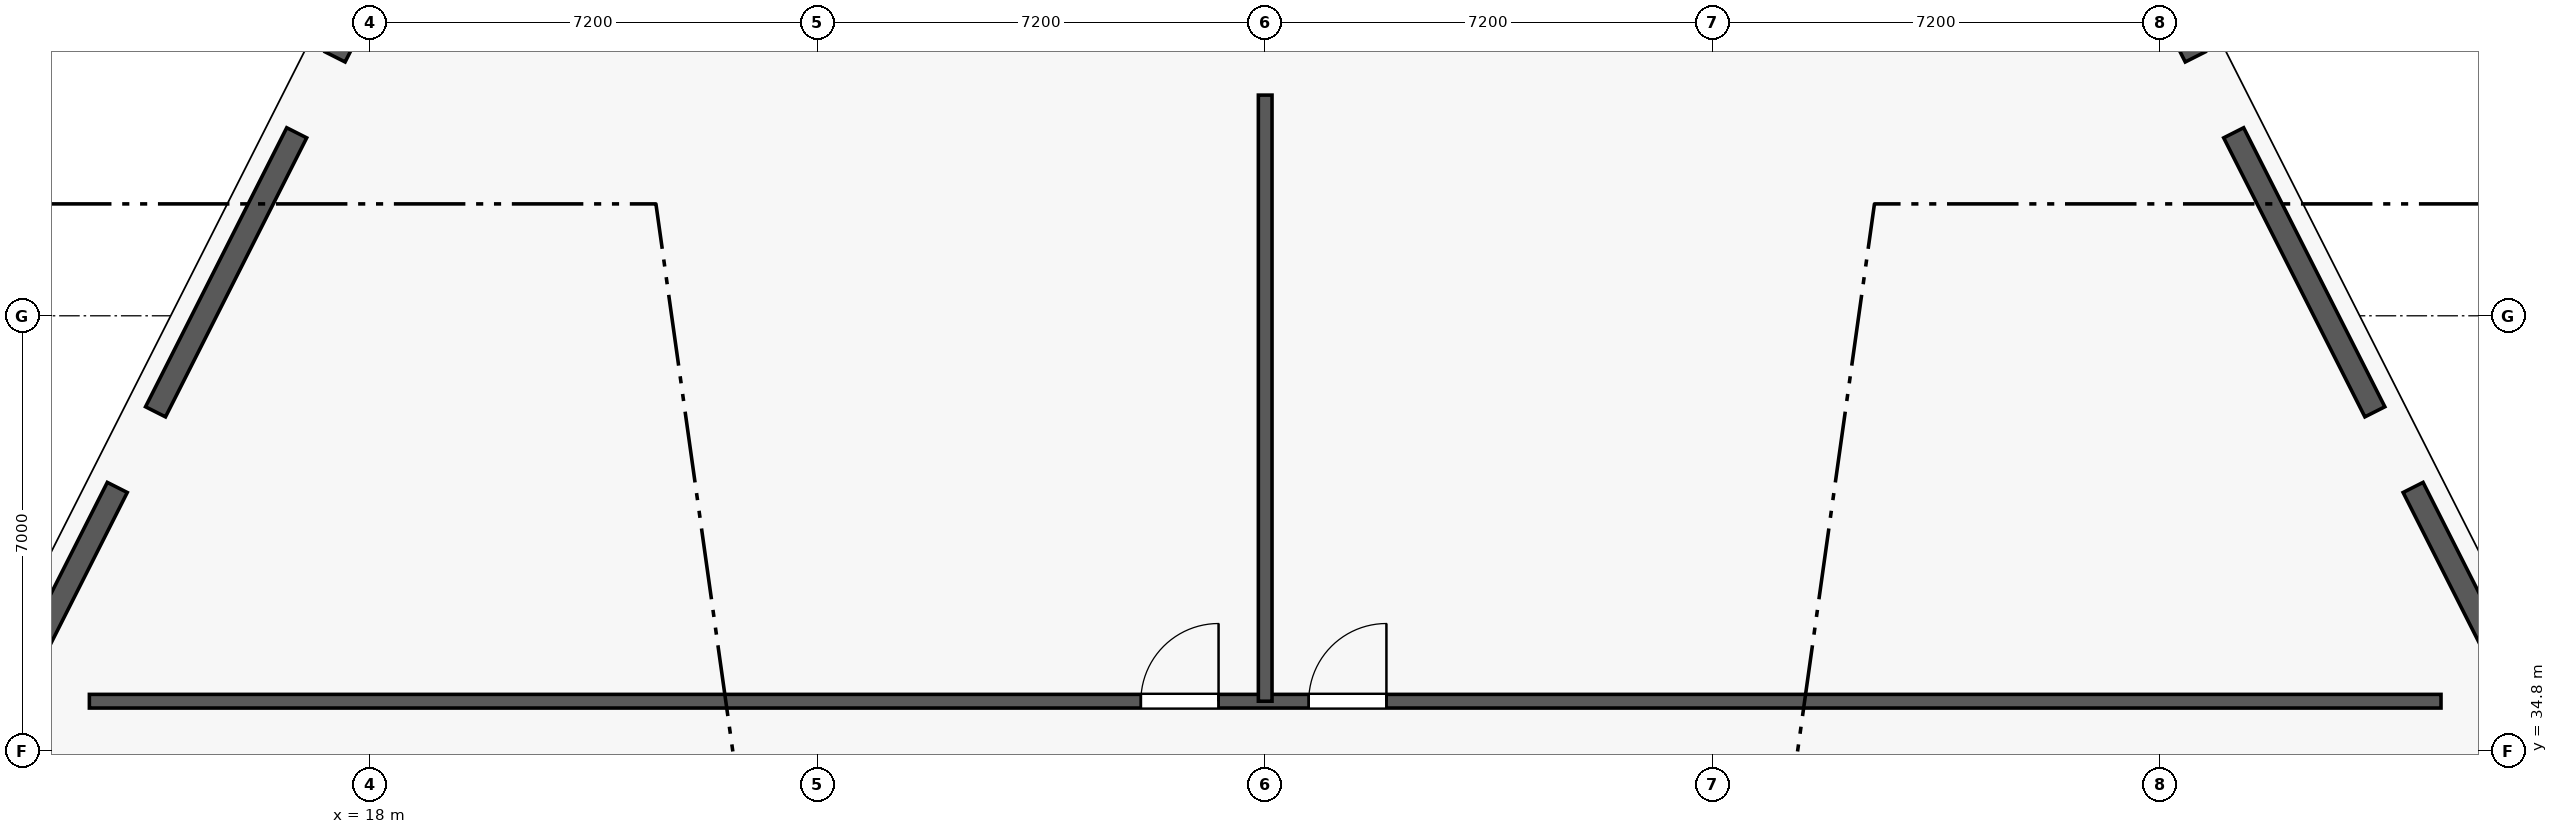
"""IFC4 building model, lengths in metres.
Left out: names, types, materials, properties, quantities, classifications, styles, units other than length and angle.
Written with IfcOpenShell. Run it as: python <this file> out.ifc"""

import sys

from ifc_helpers import new_model, si_unit, direction, frame, frame_2d, origin, origin_2d, place, context, subcontext, project, spatial, rectangle, extrude, element, fill, save


model = new_model("IFC4")
c1 = context("Model", 3, precision=1e-05, world=origin(), true_north=direction((0.0, 1.0)))
c2 = subcontext(c1, "Body", "Model", "MODEL_VIEW")
j1 = project(units=[si_unit("LENGTHUNIT", "METRE"), si_unit("PLANEANGLEUNIT", "RADIAN")], contexts=[c1])
p1 = place(None, origin())
s1 = spatial("IfcSite", under=j1, at=p1, CompositionType="ELEMENT")
p2 = place(p1, origin())
s2 = spatial("IfcBuilding", under=s1, at=p2, CompositionType="ELEMENT")
p3 = place(p2, frame((0.0, 0.0, 148.1)))
s3 = spatial("IfcBuildingStorey", under=s2, at=p3, CompositionType="ELEMENT", Elevation=148.1)
for number, where, z_axis, x_axis in (
    (1, (50.489, 39.645, 0.0), (0.0, 0.0, 1.0), (1.0, 0.0, 0.0)),
    (2, (47.649, 45.354, 0.0), (0.0, 0.0, 1.0), (1.0, 0.0, 0.0)),
    (3, (17.151, 45.354, 0.0), (0.0, 0.0, 1.0), (1.0, 0.0, 0.0)),
    (4, (14.311, 39.645, 0.0), (0.0, 0.0, 1.0), (1.0, 0.0, 0.0)),
):
    element("IfcColumn", number, at=place(p3, frame(where, z_axis=z_axis, x_axis=x_axis)), inside=s3, PredefinedType="COLUMN", context=c2, shape_type="SweptSolid", body=[
        extrude(rectangle(XDim=1.05, YDim=1.05, at=origin_2d()), origin(), (0.0, 0.0, 1.0), 5.4),
    ])
p4 = place(p3, frame((13.487, 35.6, 0.0), z_axis=(0.0, 0.0, 1.0), x_axis=(1.0, 0.0, 0.0)))
e5 = element("IfcWall", 5, at=p4, inside=s3, PredefinedType="PARTITIONING", context=c2, shape_type="SweptSolid", body=[
    extrude(rectangle(XDim=37.826, YDim=0.22, at=frame_2d((18.913, 0.0))), origin(), (0.0, 0.0, 1.0), 5.19),
])
p5 = place(p4, frame((16.913, 0.0, 0.0)))
e6 = element("IfcOpeningElement", 6, at=p5, cuts=e5, PredefinedType="OPENING", context=c2, shape_type="SweptSolid", body=[
    extrude(rectangle(XDim=1.25, YDim=2.25, at=frame_2d((0.625, 1.125))), frame((0.0, 0.12, 0.0), z_axis=(0.0, -1.0, 0.0), x_axis=(1.0, 0.0, 0.0)), (0.0, 0.0, 1.0), 0.24),
])
p6 = place(p4, frame((19.613, 0.0, 0.0)))
e7 = element("IfcOpeningElement", 7, at=p6, cuts=e5, PredefinedType="OPENING", context=c2, shape_type="SweptSolid", body=[
    extrude(rectangle(XDim=1.25, YDim=2.25, at=frame_2d((0.625, 1.125))), frame((0.0, 0.12, 0.0), z_axis=(0.0, -1.0, 0.0), x_axis=(1.0, 0.0, 0.0)), (0.0, 0.0, 1.0), 0.24),
])
p7 = place(p3, frame((32.4, 35.6, 0.0), z_axis=(0.0, 0.0, 1.0), x_axis=(0.0, 1.0, 0.0)))
e8 = element("IfcWall", 8, at=p7, inside=s3, PredefinedType="PARTITIONING", context=c2, shape_type="SweptSolid", body=[
    extrude(rectangle(XDim=9.75, YDim=0.22, at=frame_2d((4.875, 0.0))), origin(), (0.0, 0.0, 1.0), 5.19),
])
p8 = place(p3, frame((53.218, 34.386, 0.0), z_axis=(0.0, 0.0, 1.0), x_axis=(-0.451422282023, 0.892310441098, 0.0)))
e9 = element("IfcWall", 9, at=p8, inside=s3, PredefinedType="STANDARD", context=c2, shape_type="SweptSolid", body=[
    extrude(rectangle(XDim=5.215, YDim=0.36, at=frame_2d((2.607, 0.0))), origin(), (0.0, 0.0, 1.0), 4.647),
])
p9 = place(p3, frame((50.249, 40.255, 0.0), z_axis=(0.0, 0.0, 1.0), x_axis=(-0.451420992602, 0.892311093419, 0.0)))
e10 = element("IfcWall", 10, at=p9, inside=s3, PredefinedType="STANDARD", context=c2, shape_type="SweptSolid", body=[
    extrude(rectangle(XDim=5.031, YDim=0.36, at=frame_2d((2.515, 0.0))), origin(), (0.0, 0.0, 1.0), 4.647),
])
for number, where, z_axis, x_axis in (
    (11, (47.36, 45.964, 0.0), (0.0, 0.0, 1.0), (-0.451, 0.892, 0.0)),
    (12, (17.81, 46.696, 0.0), (0.0, 0.0, 1.0), (-0.451, -0.892, 0.0)),
):
    element("IfcWall", number, at=place(p3, frame(where, z_axis=z_axis, x_axis=x_axis)), inside=s3, PredefinedType="STANDARD", context=c2, shape_type="SweptSolid", body=[
        extrude(rectangle(XDim=0.82, YDim=0.36, at=frame_2d((0.41, 0.0))), origin(), (0.0, 0.0, 1.0), 5.19),
    ])
p10 = place(p3, frame((16.822, 44.744, 0.0), z_axis=(0.0, 0.0, 1.0), x_axis=(-0.451420992602, -0.892311093419, 0.0)))
e13 = element("IfcWall", 13, at=p10, inside=s3, PredefinedType="STANDARD", context=c2, shape_type="SweptSolid", body=[
    extrude(rectangle(XDim=5.031, YDim=0.36, at=frame_2d((2.515, 0.0))), origin(), (0.0, 0.0, 1.0), 4.647),
])
p11 = place(p3, frame((13.936, 39.039, 0.0), z_axis=(0.0, 0.0, 1.0), x_axis=(-0.451422282023, -0.892310441098, 0.0)))
e14 = element("IfcWall", 14, at=p11, inside=s3, PredefinedType="STANDARD", context=c2, shape_type="SweptSolid", body=[
    extrude(rectangle(XDim=5.215, YDim=0.36, at=frame_2d((2.607, 0.0))), origin(), (0.0, 0.0, 1.0), 4.647),
])
p12 = place(p5, origin())
e15 = element("IfcDoor", 15, at=p12, inside=s3, OperationType="SINGLE_SWING_RIGHT", PredefinedType="DOOR", context=c2, shape_type="SweptSolid", body=[
    extrude(rectangle(XDim=1.25, YDim=2.25, at=frame_2d((0.625, 1.125))), frame((0.0, 0.025, 0.0), z_axis=(0.0, -1.0, 0.0), x_axis=(1.0, 0.0, 0.0)), (0.0, 0.0, 1.0), 0.05),
])
fill(e6, e15)
p13 = place(p6, origin())
e16 = element("IfcDoor", 16, at=p13, inside=s3, OperationType="SINGLE_SWING_RIGHT", PredefinedType="DOOR", context=c2, shape_type="SweptSolid", body=[
    extrude(rectangle(XDim=1.25, YDim=2.25, at=frame_2d((0.625, 1.125))), frame((0.0, 0.025, 0.0), z_axis=(0.0, -1.0, 0.0), x_axis=(1.0, 0.0, 0.0)), (0.0, 0.0, 1.0), 0.05),
])
fill(e7, e16)
save(model, sys.argv[1])
